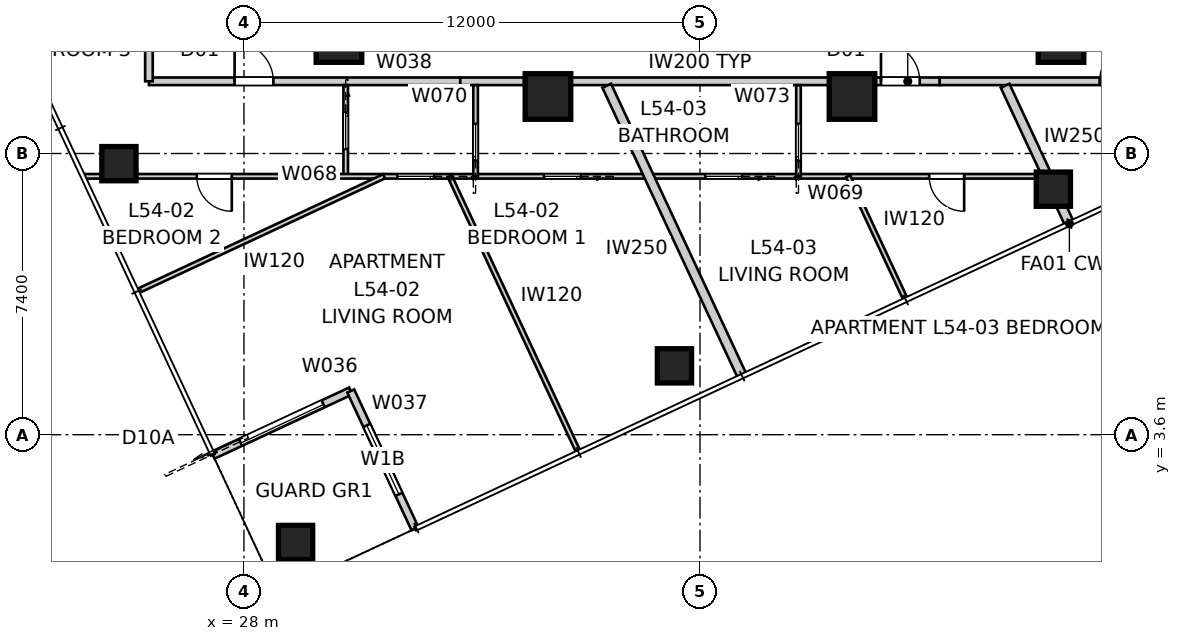
"""IFC4 building model, lengths in metres.
Left out: names, types, materials, properties, quantities, classifications, styles, units other than length and angle.
Written with IfcOpenShell. Run it as: python <this file> out.ifc"""

import sys

from ifc_helpers import new_model, si_unit, direction, frame, frame_2d, origin, origin_2d, place, context, subcontext, project, spatial, rectangle, extrude, element, fill, save


model = new_model("IFC4")
c1 = context("Model", 3, precision=1e-05, world=origin(), true_north=direction((0.0, 1.0)))
c2 = subcontext(c1, "Body", "Model", "MODEL_VIEW")
j1 = project(units=[si_unit("LENGTHUNIT", "METRE"), si_unit("PLANEANGLEUNIT", "RADIAN")], contexts=[c1])
p1 = place(None, origin())
s1 = spatial("IfcSite", under=j1, at=p1, CompositionType="ELEMENT")
p2 = place(p1, origin())
s2 = spatial("IfcBuilding", under=s1, at=p2, CompositionType="ELEMENT")
p3 = place(p2, frame((0.0, 0.0, 196.4)))
s3 = spatial("IfcBuildingStorey", under=s2, at=p3, CompositionType="ELEMENT", Elevation=196.4)
for number, where, z_axis, x_axis in (
    (1, (29.359, 0.764, 0.0), (0.0, 0.0, 1.0), (1.0, 0.0, 0.0)),
    (2, (39.328, 5.412, 0.0), (0.0, 0.0, 1.0), (1.0, 0.0, 0.0)),
    (3, (49.298, 10.061, 0.0), (0.0, 0.0, 1.0), (1.0, 0.0, 0.0)),
    (4, (24.71, 10.733, 0.0), (0.0, 0.0, 1.0), (1.0, 0.0, 0.0)),
):
    element("IfcColumn", number, at=place(p3, frame(where, z_axis=z_axis, x_axis=x_axis)), inside=s3, PredefinedType="COLUMN", context=c2, shape_type="SweptSolid", body=[
        extrude(rectangle(XDim=0.9, YDim=0.9, at=origin_2d()), origin(), (0.0, 0.0, 1.0), 3.4),
    ])
for number, where, z_axis, x_axis in (
    (5, (30.5, 14.0, 0.0), (0.0, 0.0, 1.0), (1.0, 0.0, 0.0)),
    (6, (36.0, 12.5, 0.0), (0.0, 0.0, 1.0), (1.0, 0.0, 0.0)),
    (7, (44.0, 12.5, 0.0), (0.0, 0.0, 1.0), (1.0, 0.0, 0.0)),
    (8, (49.5, 14.0, 0.0), (0.0, 0.0, 1.0), (1.0, 0.0, 0.0)),
):
    element("IfcColumn", number, at=place(p3, frame(where, z_axis=z_axis, x_axis=x_axis)), inside=s3, PredefinedType="COLUMN", context=c2, shape_type="SweptSolid", body=[
        extrude(rectangle(XDim=1.2, YDim=1.2, at=origin_2d()), origin(), (0.0, 0.0, 1.0), 3.4),
    ])
p4 = place(p3, frame((27.185, 3.06, 0.0), z_axis=(0.0, 0.0, 1.0), x_axis=(0.906289140828, 0.422658246362, 0.0)))
e9 = element("IfcWall", 9, at=p4, inside=s3, PredefinedType="SOLIDWALL", context=c2, shape_type="SweptSolid", body=[
    extrude(rectangle(XDim=4.0, YDim=0.2, at=frame_2d((2.0, 0.0))), origin(), (0.0, 0.0, 1.0), 3.25),
])
p5 = place(p4, frame((0.8, 0.0, 0.0)))
e10 = element("IfcOpeningElement", 10, at=p5, cuts=e9, PredefinedType="OPENING", context=c2, shape_type="SweptSolid", body=[
    extrude(rectangle(XDim=2.4, YDim=2.1, at=frame_2d((1.2, 1.05))), frame((0.0, 0.11, 0.0), z_axis=(0.0, -1.0, 0.0), x_axis=(1.0, 0.0, 0.0)), (0.0, 0.0, 1.0), 0.22),
])
p6 = place(p3, frame((30.81, 4.75, 0.0), z_axis=(0.0, 0.0, 1.0), x_axis=(0.422658246362, -0.906289140828, 0.0)))
e11 = element("IfcWall", 11, at=p6, inside=s3, PredefinedType="SOLIDWALL", context=c2, shape_type="SweptSolid", body=[
    extrude(rectangle(XDim=4.0, YDim=0.2, at=frame_2d((2.0, 0.0))), origin(), (0.0, 0.0, 1.0), 3.25),
])
p7 = place(p6, frame((1.0, 0.0, 0.45)))
e12 = element("IfcOpeningElement", 12, at=p7, cuts=e11, PredefinedType="OPENING", context=c2, shape_type="SweptSolid", body=[
    extrude(rectangle(XDim=2.0, YDim=1.8, at=frame_2d((1.0, 0.9))), frame((0.0, 0.11, 0.0), z_axis=(0.0, -1.0, 0.0), x_axis=(1.0, 0.0, 0.0)), (0.0, 0.0, 1.0), 0.22),
])
p8 = place(p3, frame((25.5, 12.9, 0.0), z_axis=(0.0, 0.0, 1.0), x_axis=(1.0, 0.0, 0.0)))
e13 = element("IfcWall", 13, at=p8, inside=s3, PredefinedType="PARTITIONING", context=c2, shape_type="SweptSolid", body=[
    extrude(rectangle(XDim=8.192, YDim=0.2, at=frame_2d((4.096, 0.0))), origin(), (0.0, 0.0, 1.0), 3.25),
])
p9 = place(p8, frame((2.254, 0.0, 0.0)))
e14 = element("IfcOpeningElement", 14, at=p9, cuts=e13, PredefinedType="OPENING", context=c2, shape_type="SweptSolid", body=[
    extrude(rectangle(XDim=1.02, YDim=2.34, at=frame_2d((0.51, 1.17))), frame((0.0, 0.11, 0.0), z_axis=(0.0, -1.0, 0.0), x_axis=(1.0, 0.0, 0.0)), (0.0, 0.0, 1.0), 0.22),
])
p10 = place(p3, frame((33.692, 12.9, 0.0), z_axis=(0.0, 0.0, 1.0), x_axis=(1.0, 0.0, 0.0)))
e15 = element("IfcWall", 15, at=p10, inside=s3, PredefinedType="PARTITIONING", context=c2, shape_type="SweptSolid", body=[
    extrude(rectangle(XDim=1.683, YDim=0.2, at=frame_2d((0.842, 0.0))), origin(), (0.0, 0.0, 1.0), 2.55),
])
p11 = place(p3, frame((35.375, 12.9, 0.0), z_axis=(0.0, 0.0, 1.0), x_axis=(1.0, 0.0, 0.0)))
e16 = element("IfcWall", 16, at=p11, inside=s3, PredefinedType="PARTITIONING", context=c2, shape_type="SweptSolid", body=[
    extrude(rectangle(XDim=9.25, YDim=0.2, at=frame_2d((4.625, 0.0))), origin(), (0.0, 0.0, 1.0), 3.25),
])
p12 = place(p3, frame((44.625, 12.9, 0.0), z_axis=(0.0, 0.0, 1.0), x_axis=(1.0, 0.0, 0.0)))
e17 = element("IfcWall", 17, at=p12, inside=s3, PredefinedType="PARTITIONING", context=c2, shape_type="SweptSolid", body=[
    extrude(rectangle(XDim=1.683, YDim=0.2, at=frame_2d((0.842, 0.0))), origin(), (0.0, 0.0, 1.0), 2.55),
])
p13 = place(p12, frame((0.137, 0.0, 0.0)))
e18 = element("IfcOpeningElement", 18, at=p13, cuts=e17, PredefinedType="OPENING", context=c2, shape_type="SweptSolid", body=[
    extrude(rectangle(XDim=1.02, YDim=2.34, at=frame_2d((0.51, 1.17))), frame((0.0, 0.11, 0.0), z_axis=(0.0, -1.0, 0.0), x_axis=(1.0, 0.0, 0.0)), (0.0, 0.0, 1.0), 0.22),
])
p14 = place(p3, frame((46.308, 12.9, 0.0), z_axis=(0.0, 0.0, 1.0), x_axis=(1.0, 0.0, 0.0)))
e19 = element("IfcWall", 19, at=p14, inside=s3, PredefinedType="PARTITIONING", context=c2, shape_type="SweptSolid", body=[
    extrude(rectangle(XDim=8.192, YDim=0.2, at=frame_2d((4.096, 0.0))), origin(), (0.0, 0.0, 1.0), 3.25),
])
p15 = place(p14, frame((4.207, 0.0, 0.0)))
e20 = element("IfcOpeningElement", 20, at=p15, cuts=e19, PredefinedType="OPENING", context=c2, shape_type="SweptSolid", body=[
    extrude(rectangle(XDim=1.02, YDim=2.34, at=frame_2d((0.51, 1.17))), frame((0.0, 0.11, 0.0), z_axis=(0.0, -1.0, 0.0), x_axis=(1.0, 0.0, 0.0)), (0.0, 0.0, 1.0), 0.22),
])
p16 = place(p3, frame((25.5, 46.7, 0.0), z_axis=(0.0, 0.0, 1.0), x_axis=(0.0, -1.0, 0.0)))
e21 = element("IfcWall", 21, at=p16, inside=s3, PredefinedType="PARTITIONING", context=c2, shape_type="SweptSolid", body=[
    extrude(rectangle(XDim=33.8, YDim=0.2, at=frame_2d((16.9, 0.0))), origin(), (0.0, 0.0, 1.0), 3.25),
])
p17 = place(p16, frame((15.349, 0.0, 0.0)))
e22 = element("IfcOpeningElement", 22, at=p17, cuts=e21, PredefinedType="OPENING", context=c2, shape_type="SweptSolid", body=[
    extrude(rectangle(XDim=1.02, YDim=2.34, at=frame_2d((0.51, 1.17))), frame((0.0, 0.11, 0.0), z_axis=(0.0, -1.0, 0.0), x_axis=(1.0, 0.0, 0.0)), (0.0, 0.0, 1.0), 0.22),
])
p18 = place(p3, frame((49.72, 9.155, 0.0), z_axis=(0.0, 0.0, 1.0), x_axis=(-0.422605017068, 0.906313963011, 0.0)))
e23 = element("IfcWall", 23, at=p18, inside=s3, PredefinedType="PARTITIONING", context=c2, shape_type="SweptSolid", body=[
    extrude(rectangle(XDim=4.003, YDim=0.25, at=frame_2d((2.002, 0.0))), origin(), (0.0, 0.0, 1.0), 3.25),
])
p19 = place(p3, frame((41.11, 5.14, 0.0), z_axis=(0.0, 0.0, 1.0), x_axis=(-0.422625541416, 0.906304392433, 0.0)))
e24 = element("IfcWall", 24, at=p19, inside=s3, PredefinedType="PARTITIONING", context=c2, shape_type="SweptSolid", body=[
    extrude(rectangle(XDim=8.434, YDim=0.25, at=frame_2d((4.217, 0.0))), origin(), (0.0, 0.0, 1.0), 3.25),
])
p20 = place(p3, frame((30.677, 12.8, 0.0), z_axis=(0.0, 0.0, 1.0), x_axis=(0.0, -1.0, 0.0)))
e25 = element("IfcWall", 25, at=p20, inside=s3, PredefinedType="PARTITIONING", context=c2, shape_type="SweptSolid", body=[
    extrude(rectangle(XDim=2.4, YDim=0.12, at=frame_2d((1.2, 0.0))), origin(), (0.0, 0.0, 1.0), 3.25),
])
p21 = place(p20, frame((0.72, 0.0, 0.0)))
e26 = element("IfcOpeningElement", 26, at=p21, cuts=e25, PredefinedType="OPENING", context=c2, shape_type="SweptSolid", body=[
    extrude(rectangle(XDim=0.96, YDim=2.1, at=frame_2d((0.48, 1.05))), frame((0.0, 0.07, 0.0), z_axis=(0.0, -1.0, 0.0), x_axis=(1.0, 0.0, 0.0)), (0.0, 0.0, 1.0), 0.14),
])
p22 = place(p3, frame((49.14, 10.4, 0.0), z_axis=(0.0, 0.0, 1.0), x_axis=(-1.0, 0.0, 0.0)))
e27 = element("IfcWall", 27, at=p22, inside=s3, PredefinedType="PARTITIONING", context=c2, shape_type="SweptSolid", body=[
    extrude(rectangle(XDim=25.333, YDim=0.12, at=frame_2d((12.667, 0.0))), origin(), (0.0, 0.0, 1.0), 3.25),
])
p23 = place(p22, frame((2.188, 0.0, 0.0)))
e28 = element("IfcOpeningElement", 28, at=p23, cuts=e27, PredefinedType="OPENING", context=c2, shape_type="SweptSolid", body=[
    extrude(rectangle(XDim=0.92, YDim=2.34, at=frame_2d((0.46, 1.17))), frame((0.0, 0.07, 0.0), z_axis=(0.0, -1.0, 0.0), x_axis=(1.0, 0.0, 0.0)), (0.0, 0.0, 1.0), 0.14),
])
p24 = place(p22, frame((21.46, 0.0, 0.0)))
e29 = element("IfcOpeningElement", 29, at=p24, cuts=e27, PredefinedType="OPENING", context=c2, shape_type="SweptSolid", body=[
    extrude(rectangle(XDim=0.92, YDim=2.34, at=frame_2d((0.46, 1.17))), frame((0.0, 0.07, 0.0), z_axis=(0.0, -1.0, 0.0), x_axis=(1.0, 0.0, 0.0)), (0.0, 0.0, 1.0), 0.14),
])
p25 = place(p22, frame((8.035, 0.0, 0.0)))
e30 = element("IfcOpeningElement", 30, at=p25, cuts=e27, PredefinedType="OPENING", context=c2, shape_type="SweptSolid", body=[
    extrude(rectangle(XDim=0.96, YDim=2.1, at=frame_2d((0.48, 1.05))), frame((0.0, 0.07, 0.0), z_axis=(0.0, -1.0, 0.0), x_axis=(1.0, 0.0, 0.0)), (0.0, 0.0, 1.0), 0.14),
])
p26 = place(p22, frame((16.14, 0.0, 0.0)))
e31 = element("IfcOpeningElement", 31, at=p26, cuts=e27, PredefinedType="OPENING", context=c2, shape_type="SweptSolid", body=[
    extrude(rectangle(XDim=0.96, YDim=2.1, at=frame_2d((0.48, 1.05))), frame((0.0, 0.07, 0.0), z_axis=(0.0, -1.0, 0.0), x_axis=(1.0, 0.0, 0.0)), (0.0, 0.0, 1.0), 0.14),
])
p27 = place(p22, frame((12.283, 0.0, 0.0)))
e32 = element("IfcOpeningElement", 32, at=p27, cuts=e27, PredefinedType="OPENING", context=c2, shape_type="SweptSolid", body=[
    extrude(rectangle(XDim=0.96, YDim=2.1, at=frame_2d((0.48, 1.05))), frame((0.0, 0.07, 0.0), z_axis=(0.0, -1.0, 0.0), x_axis=(1.0, 0.0, 0.0)), (0.0, 0.0, 1.0), 0.14),
])
p28 = place(p3, frame((34.096, 10.4, 0.0), z_axis=(0.0, 0.0, 1.0), x_axis=(0.0, 1.0, 0.0)))
e33 = element("IfcWall", 33, at=p28, inside=s3, PredefinedType="PARTITIONING", context=c2, shape_type="SweptSolid", body=[
    extrude(rectangle(XDim=2.4, YDim=0.12, at=frame_2d((1.2, 0.0))), origin(), (0.0, 0.0, 1.0), 3.25),
])
p29 = place(p28, frame((0.42, 0.0, 0.0)))
e34 = element("IfcOpeningElement", 34, at=p29, cuts=e33, PredefinedType="OPENING", context=c2, shape_type="SweptSolid", body=[
    extrude(rectangle(XDim=0.96, YDim=2.1, at=frame_2d((0.48, 1.05))), frame((0.0, 0.07, 0.0), z_axis=(0.0, -1.0, 0.0), x_axis=(1.0, 0.0, 0.0)), (0.0, 0.0, 1.0), 0.14),
])
p30 = place(p3, frame((33.417, 10.4, 0.0), z_axis=(0.0, 0.0, 1.0), x_axis=(0.422640876946, -0.90629724105, 0.0)))
e35 = element("IfcWall", 35, at=p30, inside=s3, PredefinedType="PARTITIONING", context=c2, shape_type="SweptSolid", body=[
    extrude(rectangle(XDim=7.979, YDim=0.12, at=frame_2d((3.989, 0.0))), origin(), (0.0, 0.0, 1.0), 3.25),
])
p31 = place(p3, frame((25.213, 7.382, 0.0), z_axis=(0.0, 0.0, 1.0), x_axis=(0.906317589158, 0.422597240388, 0.0)))
e36 = element("IfcWall", 36, at=p31, inside=s3, PredefinedType="PARTITIONING", context=c2, shape_type="SweptSolid", body=[
    extrude(rectangle(XDim=7.142, YDim=0.12, at=frame_2d((3.571, 0.0))), origin(), (0.0, 0.0, 1.0), 3.25),
])
p32 = place(p3, frame((42.592, 10.4, 0.0), z_axis=(0.0, 0.0, 1.0), x_axis=(0.0, 1.0, 0.0)))
e37 = element("IfcWall", 37, at=p32, inside=s3, PredefinedType="PARTITIONING", context=c2, shape_type="SweptSolid", body=[
    extrude(rectangle(XDim=2.4, YDim=0.12, at=frame_2d((1.2, 0.0))), origin(), (0.0, 0.0, 1.0), 3.25),
])
p33 = place(p32, frame((0.42, 0.0, 0.0)))
e38 = element("IfcOpeningElement", 38, at=p33, cuts=e37, PredefinedType="OPENING", context=c2, shape_type="SweptSolid", body=[
    extrude(rectangle(XDim=0.96, YDim=2.1, at=frame_2d((0.48, 1.05))), frame((0.0, 0.07, 0.0), z_axis=(0.0, -1.0, 0.0), x_axis=(1.0, 0.0, 0.0)), (0.0, 0.0, 1.0), 0.14),
])
p34 = place(p3, frame((43.899, 10.4, 0.0), z_axis=(0.0, 0.0, 1.0), x_axis=(0.42263686638, -0.906299111318, 0.0)))
e39 = element("IfcWall", 39, at=p34, inside=s3, PredefinedType="PARTITIONING", context=c2, shape_type="SweptSolid", body=[
    extrude(rectangle(XDim=3.549, YDim=0.12, at=frame_2d((1.774, 0.0))), origin(), (0.0, 0.0, 1.0), 3.25),
])
p35 = place(p5, origin())
e40 = element("IfcDoor", 40, at=p35, inside=s3, OperationType="SLIDING_TO_LEFT", PredefinedType="DOOR", context=c2, shape_type="SweptSolid", body=[
    extrude(rectangle(XDim=2.4, YDim=2.1, at=frame_2d((1.2, 1.05))), frame((0.0, 0.025, 0.0), z_axis=(0.0, -1.0, 0.0), x_axis=(1.0, 0.0, 0.0)), (0.0, 0.0, 1.0), 0.05),
])
fill(e10, e40)
p36 = place(p7, origin())
e41 = element("IfcWindow", 41, at=p36, inside=s3, PartitioningType="SINGLE_PANEL", PredefinedType="WINDOW", context=c2, shape_type="SweptSolid", body=[
    extrude(rectangle(XDim=2.0, YDim=1.8, at=frame_2d((1.0, 0.9))), frame((0.0, 0.03, 0.0), z_axis=(0.0, -1.0, 0.0), x_axis=(1.0, 0.0, 0.0)), (0.0, 0.0, 1.0), 0.06),
])
fill(e12, e41)
p37 = place(p15, origin())
e42 = element("IfcDoor", 42, at=p37, inside=s3, OperationType="SINGLE_SWING_RIGHT", PredefinedType="DOOR", context=c2, shape_type="SweptSolid", body=[
    extrude(rectangle(XDim=1.02, YDim=2.34, at=frame_2d((0.51, 1.17))), frame((0.0, 0.025, 0.0), z_axis=(0.0, -1.0, 0.0), x_axis=(1.0, 0.0, 0.0)), (0.0, 0.0, 1.0), 0.05),
])
fill(e20, e42)
p38 = place(p13, origin())
e43 = element("IfcDoor", 43, at=p38, inside=s3, OperationType="SINGLE_SWING_LEFT", PredefinedType="DOOR", context=c2, shape_type="SweptSolid", body=[
    extrude(rectangle(XDim=1.02, YDim=2.34, at=frame_2d((0.51, 1.17))), frame((0.0, 0.025, 0.0), z_axis=(0.0, -1.0, 0.0), x_axis=(1.0, 0.0, 0.0)), (0.0, 0.0, 1.0), 0.05),
])
fill(e18, e43)
p39 = place(p9, origin())
e44 = element("IfcDoor", 44, at=p39, inside=s3, OperationType="SINGLE_SWING_LEFT", PredefinedType="DOOR", context=c2, shape_type="SweptSolid", body=[
    extrude(rectangle(XDim=1.02, YDim=2.34, at=frame_2d((0.51, 1.17))), frame((0.0, 0.025, 0.0), z_axis=(0.0, -1.0, 0.0), x_axis=(1.0, 0.0, 0.0)), (0.0, 0.0, 1.0), 0.05),
])
fill(e14, e44)
p40 = place(p23, origin())
e45 = element("IfcDoor", 45, at=p40, inside=s3, OperationType="SINGLE_SWING_LEFT", PredefinedType="DOOR", context=c2, shape_type="SweptSolid", body=[
    extrude(rectangle(XDim=0.92, YDim=2.34, at=frame_2d((0.46, 1.17))), frame((0.0, 0.025, 0.0), z_axis=(0.0, -1.0, 0.0), x_axis=(1.0, 0.0, 0.0)), (0.0, 0.0, 1.0), 0.05),
])
fill(e28, e45)
p41 = place(p33, origin())
e46 = element("IfcDoor", 46, at=p41, inside=s3, OperationType="SLIDING_TO_LEFT", PredefinedType="DOOR", context=c2, shape_type="SweptSolid", body=[
    extrude(rectangle(XDim=0.96, YDim=2.1, at=frame_2d((0.48, 1.05))), frame((0.0, 0.025, 0.0), z_axis=(0.0, -1.0, 0.0), x_axis=(1.0, 0.0, 0.0)), (0.0, 0.0, 1.0), 0.05),
])
fill(e38, e46)
p42 = place(p24, origin())
e47 = element("IfcDoor", 47, at=p42, inside=s3, OperationType="SINGLE_SWING_LEFT", PredefinedType="DOOR", context=c2, shape_type="SweptSolid", body=[
    extrude(rectangle(XDim=0.92, YDim=2.34, at=frame_2d((0.46, 1.17))), frame((0.0, 0.025, 0.0), z_axis=(0.0, -1.0, 0.0), x_axis=(1.0, 0.0, 0.0)), (0.0, 0.0, 1.0), 0.05),
])
fill(e29, e47)
p43 = place(p21, origin())
e48 = element("IfcDoor", 48, at=p43, inside=s3, OperationType="SLIDING_TO_LEFT", PredefinedType="DOOR", context=c2, shape_type="SweptSolid", body=[
    extrude(rectangle(XDim=0.96, YDim=2.1, at=frame_2d((0.48, 1.05))), frame((0.0, 0.025, 0.0), z_axis=(0.0, -1.0, 0.0), x_axis=(1.0, 0.0, 0.0)), (0.0, 0.0, 1.0), 0.05),
])
fill(e26, e48)
p44 = place(p25, origin())
e49 = element("IfcDoor", 49, at=p44, inside=s3, OperationType="SLIDING_TO_LEFT", PredefinedType="DOOR", context=c2, shape_type="SweptSolid", body=[
    extrude(rectangle(XDim=0.96, YDim=2.1, at=frame_2d((0.48, 1.05))), frame((0.0, 0.025, 0.0), z_axis=(0.0, -1.0, 0.0), x_axis=(1.0, 0.0, 0.0)), (0.0, 0.0, 1.0), 0.05),
])
fill(e30, e49)
p45 = place(p29, origin())
e50 = element("IfcDoor", 50, at=p45, inside=s3, OperationType="SLIDING_TO_LEFT", PredefinedType="DOOR", context=c2, shape_type="SweptSolid", body=[
    extrude(rectangle(XDim=0.96, YDim=2.1, at=frame_2d((0.48, 1.05))), frame((0.0, 0.025, 0.0), z_axis=(0.0, -1.0, 0.0), x_axis=(1.0, 0.0, 0.0)), (0.0, 0.0, 1.0), 0.05),
])
fill(e34, e50)
p46 = place(p26, origin())
e51 = element("IfcDoor", 51, at=p46, inside=s3, OperationType="SLIDING_TO_LEFT", PredefinedType="DOOR", context=c2, shape_type="SweptSolid", body=[
    extrude(rectangle(XDim=0.96, YDim=2.1, at=frame_2d((0.48, 1.05))), frame((0.0, 0.025, 0.0), z_axis=(0.0, -1.0, 0.0), x_axis=(1.0, 0.0, 0.0)), (0.0, 0.0, 1.0), 0.05),
])
fill(e31, e51)
p47 = place(p27, origin())
e52 = element("IfcDoor", 52, at=p47, inside=s3, OperationType="SLIDING_TO_LEFT", PredefinedType="DOOR", context=c2, shape_type="SweptSolid", body=[
    extrude(rectangle(XDim=0.96, YDim=2.1, at=frame_2d((0.48, 1.05))), frame((0.0, 0.025, 0.0), z_axis=(0.0, -1.0, 0.0), x_axis=(1.0, 0.0, 0.0)), (0.0, 0.0, 1.0), 0.05),
])
fill(e32, e52)
save(model, sys.argv[1])
